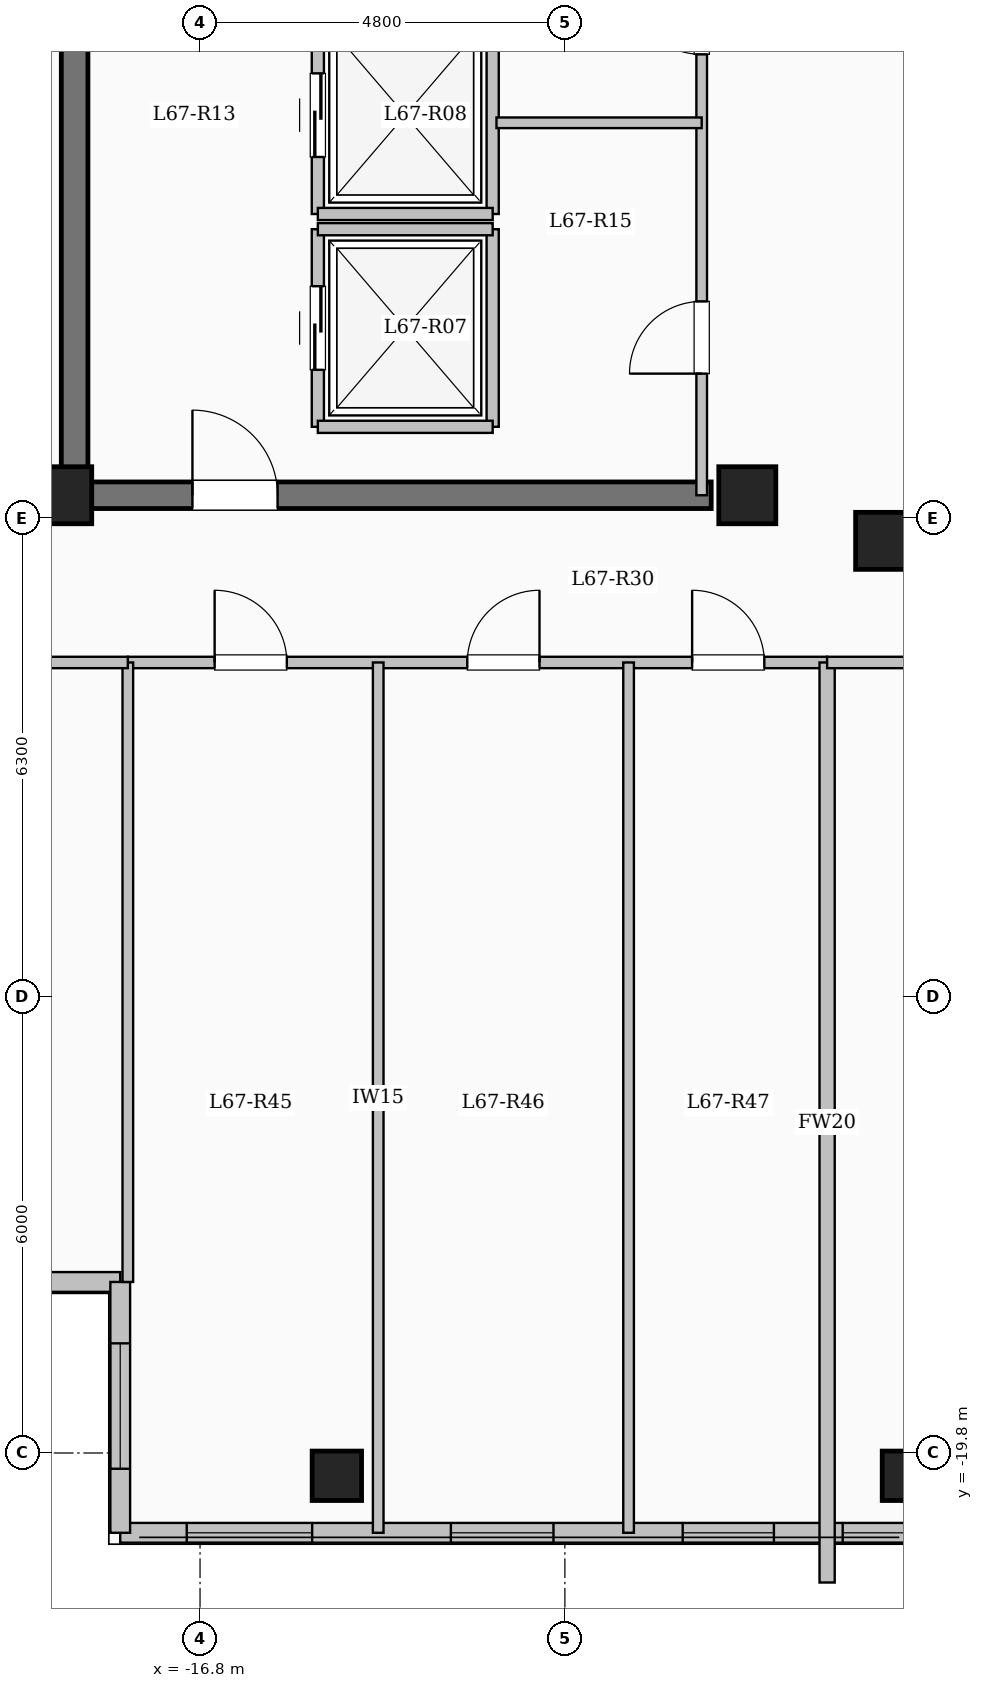
"""IFC4 building model, lengths in metres.
Left out: names, types, materials, properties, quantities, classifications, styles, units other than length and angle.
Written with IfcOpenShell. Run it as: python <this file> out.ifc"""

import sys

from ifc_helpers import new_model, si_unit, direction, frame, frame_2d, origin, origin_2d, place, context, subcontext, project, spatial, rectangle, extrude, element, fill, save


model = new_model("IFC4")
c1 = context("Model", 3, precision=1e-05, world=origin(), true_north=direction((0.0, 1.0)))
c2 = subcontext(c1, "Body", "Model", "MODEL_VIEW")
j1 = project(units=[si_unit("LENGTHUNIT", "METRE"), si_unit("PLANEANGLEUNIT", "RADIAN")], contexts=[c1])
p1 = place(None, origin())
s1 = spatial("IfcSite", under=j1, at=p1, CompositionType="ELEMENT")
p2 = place(p1, origin())
s2 = spatial("IfcBuilding", under=s1, at=p2, CompositionType="ELEMENT")
p3 = place(p2, frame((0.0, 0.0, 248.2)))
s3 = spatial("IfcBuildingStorey", under=s2, at=p3, CompositionType="ELEMENT", Elevation=248.2)
for number, where, z_axis, x_axis in (
    (1, (-7.8, -7.8, 0.0), (0.0, 0.0, 1.0), (1.0, 0.0, 0.0)),
    (2, (-9.6, -7.2, 0.0), (0.0, 0.0, 1.0), (1.0, 0.0, 0.0)),
    (3, (-18.6, -7.2, 0.0), (0.0, 0.0, 1.0), (1.0, 0.0, 0.0)),
):
    element("IfcColumn", number, at=place(p3, frame(where, z_axis=z_axis, x_axis=x_axis)), inside=s3, PredefinedType="COLUMN", context=c2, shape_type="SweptSolid", body=[
        extrude(rectangle(XDim=0.75, YDim=0.75, at=origin_2d()), origin(), (0.0, 0.0, 1.0), 3.35),
    ])
for number, where, z_axis, x_axis in (
    (4, (-15.0, -20.1, 0.0), (0.0, 0.0, 1.0), (1.0, 0.0, 0.0)),
    (5, (-7.5, -20.1, 0.0), (0.0, 0.0, 1.0), (1.0, 0.0, 0.0)),
):
    element("IfcColumn", number, at=place(p3, frame(where, z_axis=z_axis, x_axis=x_axis)), inside=s3, PredefinedType="COLUMN", context=c2, shape_type="SweptSolid", body=[
        extrude(rectangle(XDim=0.65, YDim=0.65, at=origin_2d()), origin(), (0.0, 0.0, 1.0), 3.35),
    ])
p4 = place(p3, frame((-17.85, -17.55, 0.0), z_axis=(0.0, 0.0, 1.0), x_axis=(-1.0, 0.0, 0.0)))
e6 = element("IfcWall", 6, at=p4, inside=s3, PredefinedType="SOLIDWALL", context=c2, shape_type="SweptSolid", body=[
    extrude(rectangle(XDim=4.8, YDim=0.26, at=frame_2d((2.4, 0.0))), origin(), (0.0, 0.0, 1.0), 3.1),
])
p5 = place(p4, frame((1.275, 0.0, 0.9)))
e7 = element("IfcOpeningElement", 7, at=p5, cuts=e6, PredefinedType="OPENING", context=c2, shape_type="SweptSolid", body=[
    extrude(rectangle(XDim=2.2, YDim=1.75, at=frame_2d((1.1, 0.875))), frame((0.0, 0.14, 0.0), z_axis=(0.0, -1.0, 0.0), x_axis=(1.0, 0.0, 0.0)), (0.0, 0.0, 1.0), 0.28),
])
p6 = place(p3, frame((-7.35, -20.85, 0.0), z_axis=(0.0, 0.0, 1.0), x_axis=(-1.0, 0.0, 0.0)))
e8 = element("IfcWall", 8, at=p6, inside=s3, PredefinedType="SOLIDWALL", context=c2, shape_type="SweptSolid", body=[
    extrude(rectangle(XDim=10.5, YDim=0.26, at=frame_2d((5.25, 0.0))), origin(), (0.0, 0.0, 1.0), 3.1),
])
p7 = place(p6, frame((0.145, 0.0, 0.95)))
e9 = element("IfcOpeningElement", 9, at=p7, cuts=e8, PredefinedType="OPENING", context=c2, shape_type="SweptSolid", body=[
    extrude(rectangle(XDim=0.85, YDim=1.5, at=frame_2d((0.425, 0.75))), frame((0.0, 0.14, 0.0), z_axis=(0.0, -1.0, 0.0), x_axis=(1.0, 0.0, 0.0)), (0.0, 0.0, 1.0), 0.28),
])
p8 = place(p6, frame((1.9, 0.0, 0.95)))
e10 = element("IfcOpeningElement", 10, at=p8, cuts=e8, PredefinedType="OPENING", context=c2, shape_type="SweptSolid", body=[
    extrude(rectangle(XDim=1.2, YDim=1.5, at=frame_2d((0.6, 0.75))), frame((0.0, 0.14, 0.0), z_axis=(0.0, -1.0, 0.0), x_axis=(1.0, 0.0, 0.0)), (0.0, 0.0, 1.0), 0.28),
])
p9 = place(p6, frame((4.8, 0.0, 0.95)))
e11 = element("IfcOpeningElement", 11, at=p9, cuts=e8, PredefinedType="OPENING", context=c2, shape_type="SweptSolid", body=[
    extrude(rectangle(XDim=1.35, YDim=1.55, at=frame_2d((0.675, 0.775))), frame((0.0, 0.14, 0.0), z_axis=(0.0, -1.0, 0.0), x_axis=(1.0, 0.0, 0.0)), (0.0, 0.0, 1.0), 0.28),
])
p10 = place(p6, frame((7.975, 0.0, 0.9)))
e12 = element("IfcOpeningElement", 12, at=p10, cuts=e8, PredefinedType="OPENING", context=c2, shape_type="SweptSolid", body=[
    extrude(rectangle(XDim=1.65, YDim=1.6, at=frame_2d((0.825, 0.8))), frame((0.0, 0.14, 0.0), z_axis=(0.0, -1.0, 0.0), x_axis=(1.0, 0.0, 0.0)), (0.0, 0.0, 1.0), 0.28),
])
p11 = place(p3, frame((-17.85, -20.85, 0.0), z_axis=(0.0, 0.0, 1.0), x_axis=(0.0, 1.0, 0.0)))
e13 = element("IfcWall", 13, at=p11, inside=s3, PredefinedType="SOLIDWALL", context=c2, shape_type="SweptSolid", body=[
    extrude(rectangle(XDim=3.3, YDim=0.26, at=frame_2d((1.65, 0.0))), origin(), (0.0, 0.0, 1.0), 3.1),
])
p12 = place(p11, frame((0.843, 0.0, 0.9)))
e14 = element("IfcOpeningElement", 14, at=p12, cuts=e13, PredefinedType="OPENING", context=c2, shape_type="SweptSolid", body=[
    extrude(rectangle(XDim=1.65, YDim=1.6, at=frame_2d((0.825, 0.8))), frame((0.0, 0.14, 0.0), z_axis=(0.0, -1.0, 0.0), x_axis=(1.0, 0.0, 0.0)), (0.0, 0.0, 1.0), 0.28),
])
p13 = place(p3, frame((-15.25, -6.3, 0.0), z_axis=(0.0, 0.0, 1.0), x_axis=(0.0, 1.0, 0.0)))
e15 = element("IfcWall", 15, at=p13, inside=s3, PredefinedType="SOLIDWALL", context=c2, shape_type="SweptSolid", body=[
    extrude(rectangle(XDim=2.6, YDim=0.16, at=frame_2d((1.3, 0.0))), origin(), (0.0, 0.0, 1.0), 3.1),
])
p14 = place(p13, frame((0.75, 0.0, 0.0)))
e16 = element("IfcOpeningElement", 16, at=p14, cuts=e15, PredefinedType="OPENING", context=c2, shape_type="SweptSolid", body=[
    extrude(rectangle(XDim=1.1, YDim=2.15, at=frame_2d((0.55, 1.075))), frame((0.0, 0.09, 0.0), z_axis=(0.0, -1.0, 0.0), x_axis=(1.0, 0.0, 0.0)), (0.0, 0.0, 1.0), 0.18),
])
p15 = place(p3, frame((-12.95, -6.3, 0.0), z_axis=(0.0, 0.0, 1.0), x_axis=(0.0, 1.0, 0.0)))
e17 = element("IfcWall", 17, at=p15, inside=s3, PredefinedType="SOLIDWALL", context=c2, shape_type="SweptSolid", body=[
    extrude(rectangle(XDim=2.6, YDim=0.16, at=frame_2d((1.3, 0.0))), origin(), (0.0, 0.0, 1.0), 3.1),
])
for number, where, z_axis, x_axis in (
    (18, (-15.25, -6.3, 0.0), (0.0, 0.0, 1.0), (1.0, 0.0, 0.0)),
    (19, (-15.25, -3.7, 0.0), (0.0, 0.0, 1.0), (1.0, 0.0, 0.0)),
):
    element("IfcWall", number, at=place(p3, frame(where, z_axis=z_axis, x_axis=x_axis)), inside=s3, PredefinedType="SOLIDWALL", context=c2, shape_type="SweptSolid", body=[
        extrude(rectangle(XDim=2.3, YDim=0.16, at=frame_2d((1.15, 0.0))), origin(), (0.0, 0.0, 1.0), 3.1),
    ])
p16 = place(p3, frame((-15.25, -3.5, 0.0), z_axis=(0.0, 0.0, 1.0), x_axis=(0.0, 1.0, 0.0)))
e20 = element("IfcWall", 20, at=p16, inside=s3, PredefinedType="SOLIDWALL", context=c2, shape_type="SweptSolid", body=[
    extrude(rectangle(XDim=2.6, YDim=0.16, at=frame_2d((1.3, 0.0))), origin(), (0.0, 0.0, 1.0), 3.1),
])
p17 = place(p16, frame((0.75, 0.0, 0.0)))
e21 = element("IfcOpeningElement", 21, at=p17, cuts=e20, PredefinedType="OPENING", context=c2, shape_type="SweptSolid", body=[
    extrude(rectangle(XDim=1.1, YDim=2.15, at=frame_2d((0.55, 1.075))), frame((0.0, 0.09, 0.0), z_axis=(0.0, -1.0, 0.0), x_axis=(1.0, 0.0, 0.0)), (0.0, 0.0, 1.0), 0.18),
])
p18 = place(p3, frame((-12.95, -3.5, 0.0), z_axis=(0.0, 0.0, 1.0), x_axis=(0.0, 1.0, 0.0)))
e22 = element("IfcWall", 22, at=p18, inside=s3, PredefinedType="SOLIDWALL", context=c2, shape_type="SweptSolid", body=[
    extrude(rectangle(XDim=2.6, YDim=0.16, at=frame_2d((1.3, 0.0))), origin(), (0.0, 0.0, 1.0), 3.1),
])
p19 = place(p3, frame((-15.25, -3.5, 0.0), z_axis=(0.0, 0.0, 1.0), x_axis=(1.0, 0.0, 0.0)))
e23 = element("IfcWall", 23, at=p19, inside=s3, PredefinedType="SOLIDWALL", context=c2, shape_type="SweptSolid", body=[
    extrude(rectangle(XDim=2.3, YDim=0.16, at=frame_2d((1.15, 0.0))), origin(), (0.0, 0.0, 1.0), 3.1),
])
p20 = place(p3, frame((-18.45, -7.375, 0.0), z_axis=(0.0, 0.0, 1.0), x_axis=(0.0, 1.0, 0.0)))
e24 = element("IfcWall", 24, at=p20, inside=s3, PredefinedType="SHEAR", context=c2, shape_type="SweptSolid", body=[
    extrude(rectangle(XDim=14.05, YDim=0.35, at=frame_2d((7.025, 0.0))), origin(), (0.0, 0.0, 1.0), 3.35),
])
p21 = place(p3, frame((-18.625, -7.2, 0.0), z_axis=(0.0, 0.0, 1.0), x_axis=(1.0, 0.0, 0.0)))
e25 = element("IfcWall", 25, at=p21, inside=s3, PredefinedType="SHEAR", context=c2, shape_type="SweptSolid", body=[
    extrude(rectangle(XDim=8.55, YDim=0.35, at=frame_2d((4.275, 0.0))), origin(), (0.0, 0.0, 1.0), 3.35),
])
p22 = place(p21, frame((1.725, 0.0, 0.0)))
e26 = element("IfcOpeningElement", 26, at=p22, cuts=e25, PredefinedType="OPENING", context=c2, shape_type="SweptSolid", body=[
    extrude(rectangle(XDim=1.12, YDim=2.15, at=frame_2d((0.56, 1.075))), frame((0.0, 0.185, 0.0), z_axis=(0.0, -1.0, 0.0), x_axis=(1.0, 0.0, 0.0)), (0.0, 0.0, 1.0), 0.37),
])
p23 = place(p3, frame((-10.2, -7.2, 0.0), z_axis=(0.0, 0.0, 1.0), x_axis=(0.0, 1.0, 0.0)))
e27 = element("IfcWall", 27, at=p23, inside=s3, PredefinedType="PARTITIONING", context=c2, shape_type="SweptSolid", body=[
    extrude(rectangle(XDim=9.12, YDim=0.14, at=frame_2d((4.56, 0.0))), origin(), (0.0, 0.0, 1.0), 3.1),
])
p24 = place(p23, frame((1.6, 0.0, 0.0)))
e28 = element("IfcOpeningElement", 28, at=p24, cuts=e27, PredefinedType="OPENING", context=c2, shape_type="SweptSolid", body=[
    extrude(rectangle(XDim=0.95, YDim=2.12, at=frame_2d((0.475, 1.06))), frame((0.0, 0.08, 0.0), z_axis=(0.0, -1.0, 0.0), x_axis=(1.0, 0.0, 0.0)), (0.0, 0.0, 1.0), 0.16),
])
p25 = place(p23, frame((5.8, 0.0, 0.0)))
e29 = element("IfcOpeningElement", 29, at=p25, cuts=e27, PredefinedType="OPENING", context=c2, shape_type="SweptSolid", body=[
    extrude(rectangle(XDim=0.95, YDim=2.12, at=frame_2d((0.475, 1.06))), frame((0.0, 0.08, 0.0), z_axis=(0.0, -1.0, 0.0), x_axis=(1.0, 0.0, 0.0)), (0.0, 0.0, 1.0), 0.16),
])
p26 = place(p3, frame((-12.9, -2.3, 0.0), z_axis=(0.0, 0.0, 1.0), x_axis=(1.0, 0.0, 0.0)))
e30 = element("IfcWall", 30, at=p26, inside=s3, PredefinedType="PARTITIONING", context=c2, shape_type="SweptSolid", body=[
    extrude(rectangle(XDim=2.7, YDim=0.14, at=frame_2d((1.35, 0.0))), origin(), (0.0, 0.0, 1.0), 3.1),
])
p27 = place(p3, frame((-17.75, -9.4, 0.0), z_axis=(0.0, 0.0, 1.0), x_axis=(1.0, 0.0, 0.0)))
e31 = element("IfcWall", 31, at=p27, inside=s3, PredefinedType="PARTITIONING", context=c2, shape_type="SweptSolid", body=[
    extrude(rectangle(XDim=9.2, YDim=0.15, at=frame_2d((4.6, 0.0))), origin(), (0.0, 0.0, 1.0), 3.1),
])
p28 = place(p27, frame((1.142, 0.0, 0.0)))
e32 = element("IfcOpeningElement", 32, at=p28, cuts=e31, PredefinedType="OPENING", context=c2, shape_type="SweptSolid", body=[
    extrude(rectangle(XDim=0.95, YDim=2.15, at=frame_2d((0.475, 1.075))), frame((0.0, 0.085, 0.0), z_axis=(0.0, -1.0, 0.0), x_axis=(1.0, 0.0, 0.0)), (0.0, 0.0, 1.0), 0.17),
])
p29 = place(p27, frame((4.466, 0.0, 0.0)))
e33 = element("IfcOpeningElement", 33, at=p29, cuts=e31, PredefinedType="OPENING", context=c2, shape_type="SweptSolid", body=[
    extrude(rectangle(XDim=0.95, YDim=2.15, at=frame_2d((0.475, 1.075))), frame((0.0, 0.085, 0.0), z_axis=(0.0, -1.0, 0.0), x_axis=(1.0, 0.0, 0.0)), (0.0, 0.0, 1.0), 0.17),
])
p30 = place(p27, frame((7.424, 0.0, 0.0)))
e34 = element("IfcOpeningElement", 34, at=p30, cuts=e31, PredefinedType="OPENING", context=c2, shape_type="SweptSolid", body=[
    extrude(rectangle(XDim=0.95, YDim=2.15, at=frame_2d((0.475, 1.075))), frame((0.0, 0.085, 0.0), z_axis=(0.0, -1.0, 0.0), x_axis=(1.0, 0.0, 0.0)), (0.0, 0.0, 1.0), 0.17),
])
for number, where, z_axis, x_axis in (
    (35, (-14.456, -20.85, 0.0), (0.0, 0.0, 1.0), (0.0, 1.0, 0.0)),
    (36, (-11.162, -20.85, 0.0), (0.0, 0.0, 1.0), (0.0, 1.0, 0.0)),
):
    element("IfcWall", number, at=place(p3, frame(where, z_axis=z_axis, x_axis=x_axis)), inside=s3, PredefinedType="PARTITIONING", context=c2, shape_type="SweptSolid", body=[
        extrude(rectangle(XDim=11.45, YDim=0.14, at=frame_2d((5.725, 0.0))), origin(), (0.0, 0.0, 1.0), 3.1),
    ])
p31 = place(p3, frame((-8.55, -21.504, 0.0), z_axis=(0.0, 0.0, 1.0), x_axis=(0.0, 1.0, 0.0)))
e37 = element("IfcWall", 37, at=p31, inside=s3, PredefinedType="SOLIDWALL", context=c2, shape_type="SweptSolid", body=[
    extrude(rectangle(XDim=12.104, YDim=0.2, at=frame_2d((6.052, 0.0))), origin(), (0.0, 0.0, 1.0), 3.1),
])
p32 = place(p3, frame((-8.55, -9.4, 0.0), z_axis=(0.0, 0.0, 1.0), x_axis=(1.0, 0.0, 0.0)))
e38 = element("IfcWall", 38, at=p32, inside=s3, PredefinedType="PARTITIONING", context=c2, shape_type="SweptSolid", body=[
    extrude(rectangle(XDim=17.1, YDim=0.15, at=frame_2d((8.55, 0.0))), origin(), (0.0, 0.0, 1.0), 3.1),
])
p33 = place(p32, frame((1.75, 0.0, 0.0)))
e39 = element("IfcOpeningElement", 39, at=p33, cuts=e38, PredefinedType="OPENING", context=c2, shape_type="SweptSolid", body=[
    extrude(rectangle(XDim=0.96, YDim=2.15, at=frame_2d((0.48, 1.075))), frame((0.0, 0.085, 0.0), z_axis=(0.0, -1.0, 0.0), x_axis=(1.0, 0.0, 0.0)), (0.0, 0.0, 1.0), 0.17),
])
p34 = place(p3, frame((-22.68, -7.25, 0.0), z_axis=(0.0, 0.0, 1.0), x_axis=(1.0, 0.0, 0.0)))
e40 = element("IfcWall", 40, at=p34, inside=s3, PredefinedType="PARTITIONING", context=c2, shape_type="SweptSolid", body=[
    extrude(rectangle(XDim=4.23, YDim=0.15, at=frame_2d((2.115, 0.0))), origin(), (0.0, 0.0, 1.0), 3.1),
])
p35 = place(p34, frame((1.63, 0.0, 0.0)))
e41 = element("IfcOpeningElement", 41, at=p35, cuts=e40, PredefinedType="OPENING", context=c2, shape_type="SweptSolid", body=[
    extrude(rectangle(XDim=1.08, YDim=2.15, at=frame_2d((0.54, 1.075))), frame((0.0, 0.085, 0.0), z_axis=(0.0, -1.0, 0.0), x_axis=(1.0, 0.0, 0.0)), (0.0, 0.0, 1.0), 0.17),
])
p36 = place(p3, frame((-17.75, -17.55, 0.0), z_axis=(0.0, 0.0, 1.0), x_axis=(0.0, 1.0, 0.0)))
e42 = element("IfcWall", 42, at=p36, inside=s3, PredefinedType="PARTITIONING", context=c2, shape_type="SweptSolid", body=[
    extrude(rectangle(XDim=8.15, YDim=0.14, at=frame_2d((4.075, 0.0))), origin(), (0.0, 0.0, 1.0), 3.1),
])
p37 = place(p3, frame((-22.68, -9.4, 0.0), z_axis=(0.0, 0.0, 1.0), x_axis=(1.0, 0.0, 0.0)))
e43 = element("IfcWall", 43, at=p37, inside=s3, PredefinedType="PARTITIONING", context=c2, shape_type="SweptSolid", body=[
    extrude(rectangle(XDim=4.93, YDim=0.15, at=frame_2d((2.465, 0.0))), origin(), (0.0, 0.0, 1.0), 3.1),
])
p38 = place(p37, frame((1.99, 0.0, 0.0)))
e44 = element("IfcOpeningElement", 44, at=p38, cuts=e43, PredefinedType="OPENING", context=c2, shape_type="SweptSolid", body=[
    extrude(rectangle(XDim=0.95, YDim=2.15, at=frame_2d((0.475, 1.075))), frame((0.0, 0.085, 0.0), z_axis=(0.0, -1.0, 0.0), x_axis=(1.0, 0.0, 0.0)), (0.0, 0.0, 1.0), 0.17),
])
p39 = place(p7, origin())
e45 = element("IfcWindow", 45, at=p39, inside=s3, PartitioningType="SINGLE_PANEL", PredefinedType="WINDOW", context=c2, shape_type="SweptSolid", body=[
    extrude(rectangle(XDim=0.85, YDim=1.5, at=frame_2d((0.425, 0.75))), frame((0.0, 0.03, 0.0), z_axis=(0.0, -1.0, 0.0), x_axis=(1.0, 0.0, 0.0)), (0.0, 0.0, 1.0), 0.06),
])
fill(e9, e45)
p40 = place(p8, origin())
e46 = element("IfcWindow", 46, at=p40, inside=s3, PartitioningType="SINGLE_PANEL", PredefinedType="WINDOW", context=c2, shape_type="SweptSolid", body=[
    extrude(rectangle(XDim=1.2, YDim=1.5, at=frame_2d((0.6, 0.75))), frame((0.0, 0.03, 0.0), z_axis=(0.0, -1.0, 0.0), x_axis=(1.0, 0.0, 0.0)), (0.0, 0.0, 1.0), 0.06),
])
fill(e10, e46)
p41 = place(p9, origin())
e47 = element("IfcWindow", 47, at=p41, inside=s3, PartitioningType="SINGLE_PANEL", PredefinedType="WINDOW", context=c2, shape_type="SweptSolid", body=[
    extrude(rectangle(XDim=1.35, YDim=1.55, at=frame_2d((0.675, 0.775))), frame((0.0, 0.03, 0.0), z_axis=(0.0, -1.0, 0.0), x_axis=(1.0, 0.0, 0.0)), (0.0, 0.0, 1.0), 0.06),
])
fill(e11, e47)
p42 = place(p10, origin())
e48 = element("IfcWindow", 48, at=p42, inside=s3, PartitioningType="SINGLE_PANEL", PredefinedType="WINDOW", context=c2, shape_type="SweptSolid", body=[
    extrude(rectangle(XDim=1.65, YDim=1.6, at=frame_2d((0.825, 0.8))), frame((0.0, 0.03, 0.0), z_axis=(0.0, -1.0, 0.0), x_axis=(1.0, 0.0, 0.0)), (0.0, 0.0, 1.0), 0.06),
])
fill(e12, e48)
p43 = place(p12, origin())
e49 = element("IfcWindow", 49, at=p43, inside=s3, PartitioningType="SINGLE_PANEL", PredefinedType="WINDOW", context=c2, shape_type="SweptSolid", body=[
    extrude(rectangle(XDim=1.65, YDim=1.6, at=frame_2d((0.825, 0.8))), frame((0.0, 0.03, 0.0), z_axis=(0.0, -1.0, 0.0), x_axis=(1.0, 0.0, 0.0)), (0.0, 0.0, 1.0), 0.06),
])
fill(e14, e49)
p44 = place(p14, origin())
e50 = element("IfcDoor", 50, at=p44, inside=s3, OperationType="SLIDING_TO_LEFT", PredefinedType="DOOR", context=c2, shape_type="SweptSolid", body=[
    extrude(rectangle(XDim=1.1, YDim=2.15, at=frame_2d((0.55, 1.075))), frame((0.0, 0.025, 0.0), z_axis=(0.0, -1.0, 0.0), x_axis=(1.0, 0.0, 0.0)), (0.0, 0.0, 1.0), 0.05),
])
fill(e16, e50)
p45 = place(p17, origin())
e51 = element("IfcDoor", 51, at=p45, inside=s3, OperationType="SLIDING_TO_LEFT", PredefinedType="DOOR", context=c2, shape_type="SweptSolid", body=[
    extrude(rectangle(XDim=1.1, YDim=2.15, at=frame_2d((0.55, 1.075))), frame((0.0, 0.025, 0.0), z_axis=(0.0, -1.0, 0.0), x_axis=(1.0, 0.0, 0.0)), (0.0, 0.0, 1.0), 0.05),
])
fill(e21, e51)
p46 = place(p22, origin())
e52 = element("IfcDoor", 52, at=p46, inside=s3, OperationType="SINGLE_SWING_LEFT", PredefinedType="DOOR", context=c2, shape_type="SweptSolid", body=[
    extrude(rectangle(XDim=1.12, YDim=2.15, at=frame_2d((0.56, 1.075))), frame((0.0, 0.025, 0.0), z_axis=(0.0, -1.0, 0.0), x_axis=(1.0, 0.0, 0.0)), (0.0, 0.0, 1.0), 0.05),
])
fill(e26, e52)
p47 = place(p24, origin())
e53 = element("IfcDoor", 53, at=p47, inside=s3, OperationType="SINGLE_SWING_LEFT", PredefinedType="DOOR", context=c2, shape_type="SweptSolid", body=[
    extrude(rectangle(XDim=0.95, YDim=2.12, at=frame_2d((0.475, 1.06))), frame((0.0, 0.025, 0.0), z_axis=(0.0, -1.0, 0.0), x_axis=(1.0, 0.0, 0.0)), (0.0, 0.0, 1.0), 0.05),
])
fill(e28, e53)
p48 = place(p25, origin())
e54 = element("IfcDoor", 54, at=p48, inside=s3, OperationType="SINGLE_SWING_RIGHT", PredefinedType="DOOR", context=c2, shape_type="SweptSolid", body=[
    extrude(rectangle(XDim=0.95, YDim=2.12, at=frame_2d((0.475, 1.06))), frame((0.0, 0.025, 0.0), z_axis=(0.0, -1.0, 0.0), x_axis=(1.0, 0.0, 0.0)), (0.0, 0.0, 1.0), 0.05),
])
fill(e29, e54)
p49 = place(p28, origin())
e55 = element("IfcDoor", 55, at=p49, inside=s3, OperationType="SINGLE_SWING_LEFT", PredefinedType="DOOR", context=c2, shape_type="SweptSolid", body=[
    extrude(rectangle(XDim=0.95, YDim=2.15, at=frame_2d((0.475, 1.075))), frame((0.0, 0.025, 0.0), z_axis=(0.0, -1.0, 0.0), x_axis=(1.0, 0.0, 0.0)), (0.0, 0.0, 1.0), 0.05),
])
fill(e32, e55)
p50 = place(p29, origin())
e56 = element("IfcDoor", 56, at=p50, inside=s3, OperationType="SINGLE_SWING_RIGHT", PredefinedType="DOOR", context=c2, shape_type="SweptSolid", body=[
    extrude(rectangle(XDim=0.95, YDim=2.15, at=frame_2d((0.475, 1.075))), frame((0.0, 0.025, 0.0), z_axis=(0.0, -1.0, 0.0), x_axis=(1.0, 0.0, 0.0)), (0.0, 0.0, 1.0), 0.05),
])
fill(e33, e56)
p51 = place(p30, origin())
e57 = element("IfcDoor", 57, at=p51, inside=s3, OperationType="SINGLE_SWING_LEFT", PredefinedType="DOOR", context=c2, shape_type="SweptSolid", body=[
    extrude(rectangle(XDim=0.95, YDim=2.15, at=frame_2d((0.475, 1.075))), frame((0.0, 0.025, 0.0), z_axis=(0.0, -1.0, 0.0), x_axis=(1.0, 0.0, 0.0)), (0.0, 0.0, 1.0), 0.05),
])
fill(e34, e57)
save(model, sys.argv[1])
